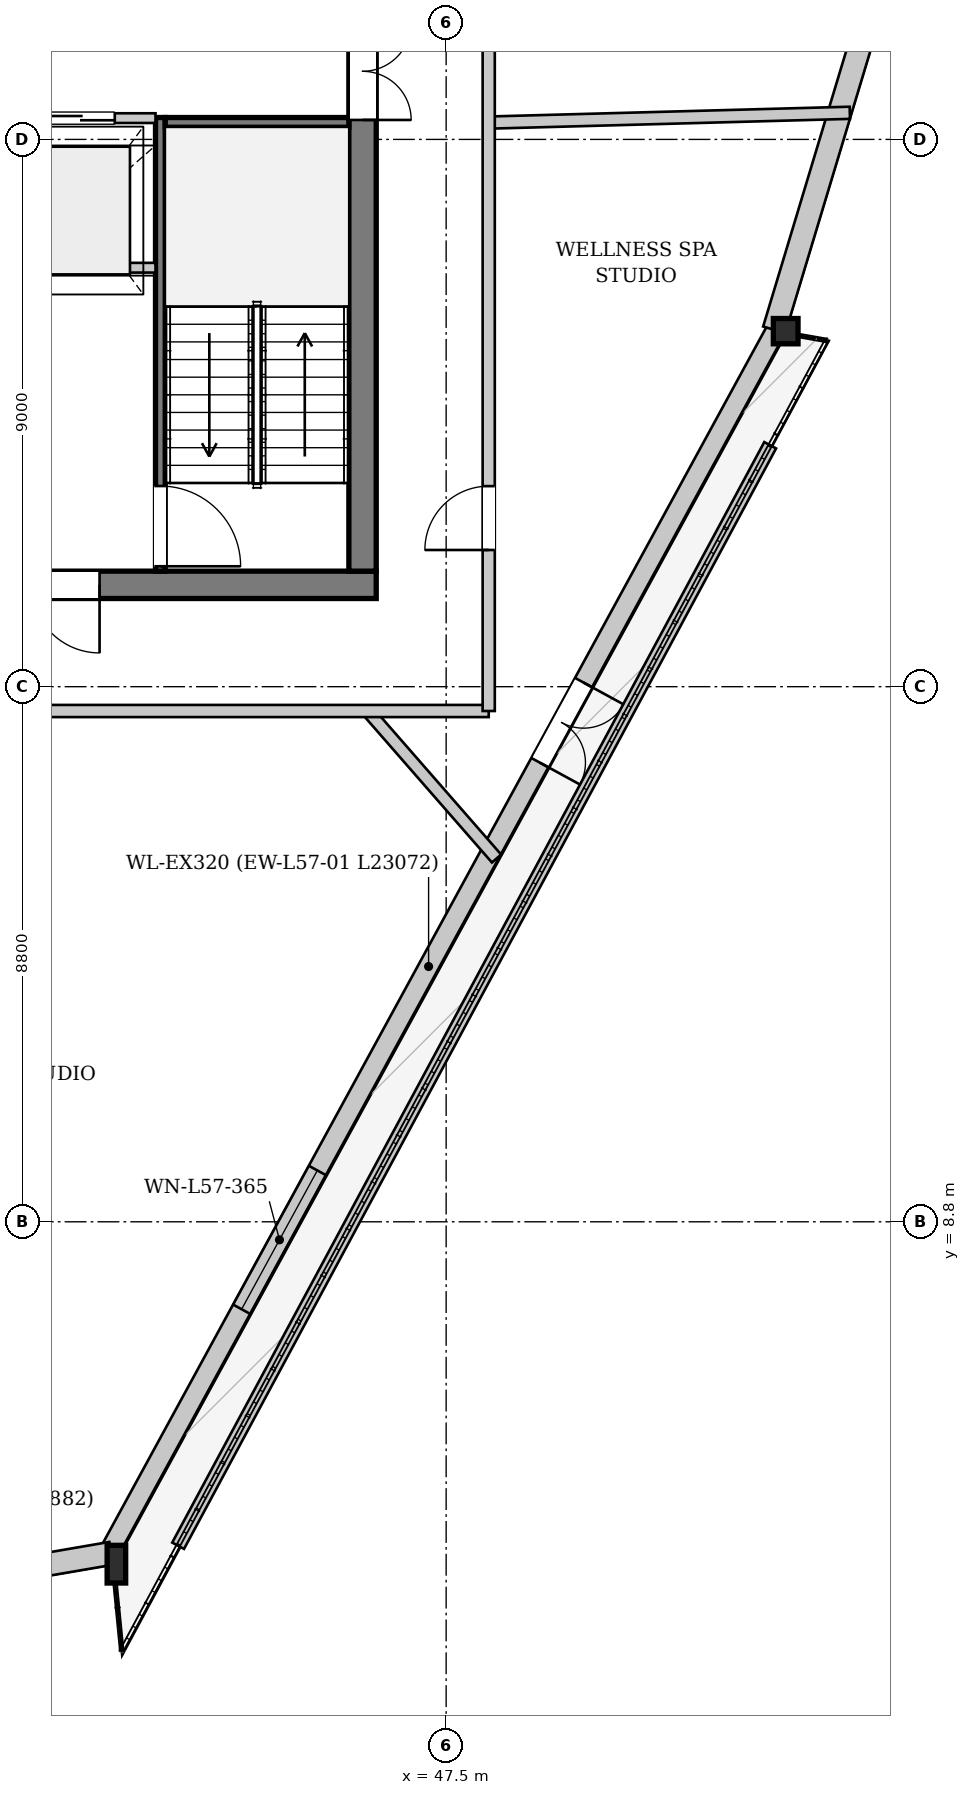
"""IFC4 building model, lengths in metres.
Left out: names, types, materials, properties, quantities, classifications, styles, units other than length and angle.
Written with IfcOpenShell. Run it as: python <this file> out.ifc"""

import sys

from ifc_helpers import new_model, si_unit, direction, frame, frame_2d, origin, origin_2d, place, context, subcontext, project, spatial, rectangle, i_section, extrude, source, transform, mapped, element, fill, save


model = new_model("IFC4")
c1 = context("Model", 3, precision=1e-05, world=origin(), true_north=direction((0.0, 1.0)))
c2 = subcontext(c1, "Body", "Model", "MODEL_VIEW")
j1 = project(units=[si_unit("LENGTHUNIT", "METRE"), si_unit("PLANEANGLEUNIT", "RADIAN")], contexts=[c1])
p1 = place(None, origin())
s1 = spatial("IfcSite", under=j1, at=p1, CompositionType="ELEMENT")
p2 = place(p1, origin())
s2 = spatial("IfcBuilding", under=s1, at=p2, CompositionType="ELEMENT")
p3 = place(p2, frame((0.0, 0.0, 216.7)))
s3 = spatial("IfcBuildingStorey", under=s2, at=p3, CompositionType="ELEMENT", Elevation=216.7)
m1 = source(origin(), c2, "Body", "SweptSolid", [
    extrude(i_section(OverallWidth=0.305, OverallDepth=0.62, WebThickness=0.021, FlangeThickness=0.04, at=origin_2d()), origin(), (0.0, 0.0, 1.0), 3.387),
])
p4 = place(p3, frame((42.026, 3.161, 0.0), z_axis=(0.030205770374, 0.005262580519, 0.99952984782), x_axis=(-0.17163884395, 0.985159939932, 0.0)))
e1 = element("IfcColumn", 1, at=p4, inside=s3, PredefinedType="COLUMN", context=c2, shape_type="MappedRepresentation", body=[
    mapped(m1, transform((0.0, 0.0, 0.0), x_axis=(1.0, 0.0, 0.0), y_axis=(0.0, 1.0, 0.0), z_axis=(0.0, 0.0, 1.0), scale=1.0)),
])
m2 = source(origin(), c2, "Body", "SweptSolid", [
    extrude(i_section(OverallWidth=0.406, OverallDepth=0.416, WebThickness=0.027, FlangeThickness=0.042, at=origin_2d()), origin(), (0.0, 0.0, 1.0), 3.386),
])
p5 = place(p3, frame((53.077, 23.414, 0.0), z_axis=(0.004038154122, 0.019397561765, 0.999803694687), x_axis=(-0.979010687194, 0.203808916293, 0.0)))
e2 = element("IfcColumn", 2, at=p5, inside=s3, PredefinedType="COLUMN", context=c2, shape_type="MappedRepresentation", body=[
    mapped(m2, transform((0.0, 0.0, 0.0), x_axis=(1.0, 0.0, 0.0), y_axis=(0.0, 1.0, 0.0), z_axis=(0.0, 0.0, 1.0), scale=1.0)),
])
p6 = place(p3, frame((52.937, 23.49, 0.0), z_axis=(0.0, 0.0, 1.0), x_axis=(-0.479001143565, -0.877814276748, 0.0)))
e3 = element("IfcWall", 3, at=p6, inside=s3, PredefinedType="SOLIDWALL", context=c2, shape_type="SweptSolid", body=[
    extrude(rectangle(XDim=23.072, YDim=0.32, at=frame_2d((11.536, 0.0))), origin(), (0.0, 0.0, 1.0), 2.822),
])
p7 = place(p6, frame((6.633, 0.0, 0.0)))
e4 = element("IfcOpeningElement", 4, at=p7, cuts=e3, PredefinedType="OPENING", context=c2, shape_type="SweptSolid", body=[
    extrude(rectangle(XDim=1.5, YDim=2.3, at=frame_2d((0.75, 1.15))), frame((0.0, 0.17, 0.0), z_axis=(0.0, -1.0, 0.0), x_axis=(1.0, 0.0, 0.0)), (0.0, 0.0, 1.0), 0.34),
])
p8 = place(p6, frame((15.773, 0.0, 0.352)))
e5 = element("IfcOpeningElement", 5, at=p8, cuts=e3, PredefinedType="OPENING", context=c2, shape_type="SweptSolid", body=[
    extrude(rectangle(XDim=2.6, YDim=2.35, at=frame_2d((1.3, 1.175))), frame((0.0, 0.17, 0.0), z_axis=(0.0, -1.0, 0.0), x_axis=(1.0, 0.0, 0.0)), (0.0, 0.0, 1.0), 0.34),
])
p9 = place(p3, frame((41.993, 3.348, 0.0), z_axis=(0.0, 0.0, 1.0), x_axis=(-0.985564143449, -0.169302448737, 0.0)))
e6 = element("IfcWall", 6, at=p9, inside=s3, PredefinedType="SOLIDWALL", context=c2, shape_type="SweptSolid", body=[
    extrude(rectangle(XDim=3.882, YDim=0.38, at=frame_2d((1.941, 0.0))), origin(), (0.0, 0.0, 1.0), 2.822),
])
p10 = place(p3, frame((59.556, 45.558, 0.0), z_axis=(0.0, 0.0, 1.0), x_axis=(-0.288699918193, -0.95741963487, 0.0)))
e7 = element("IfcWall", 7, at=p10, inside=s3, PredefinedType="SOLIDWALL", context=c2, shape_type="SweptSolid", body=[
    extrude(rectangle(XDim=23.072, YDim=0.38, at=frame_2d((11.536, 0.0))), origin(), (0.0, 0.0, 1.0), 2.822),
])
p11 = place(p10, frame((5.36, 0.0, 0.452)))
e8 = element("IfcOpeningElement", 8, at=p11, cuts=e7, PredefinedType="OPENING", context=c2, shape_type="SweptSolid", body=[
    extrude(rectangle(XDim=2.2, YDim=2.25, at=frame_2d((1.1, 1.125))), frame((0.0, 0.2, 0.0), z_axis=(0.0, -1.0, 0.0), x_axis=(1.0, 0.0, 0.0)), (0.0, 0.0, 1.0), 0.4),
])
p12 = place(p10, frame((15.512, 0.0, 0.452)))
e9 = element("IfcOpeningElement", 9, at=p12, cuts=e7, PredefinedType="OPENING", context=c2, shape_type="SweptSolid", body=[
    extrude(rectangle(XDim=2.2, YDim=2.25, at=frame_2d((1.1, 1.125))), frame((0.0, 0.2, 0.0), z_axis=(0.0, -1.0, 0.0), x_axis=(1.0, 0.0, 0.0)), (0.0, 0.0, 1.0), 0.4),
])
p13 = place(p3, frame((43.092, 3.473, 0.0), z_axis=(0.0, 0.0, 1.0), x_axis=(0.473808636285, 0.880627830688, 0.0)))
e10 = element("IfcWall", 10, at=p13, inside=s3, PredefinedType="PARAPET", context=c2, shape_type="SweptSolid", body=[
    extrude(rectangle(XDim=20.551, YDim=0.22, at=frame_2d((10.275, 0.0))), origin(), (0.0, 0.0, 1.0), 0.3),
])
p14 = place(p3, frame((46.35, 19.275, 0.0), z_axis=(0.0, 0.0, 1.0), x_axis=(-1.0, 0.0, 0.0)))
e11 = element("IfcWall", 11, at=p14, inside=s3, PredefinedType="SHEAR", context=c2, shape_type="SweptSolid", body=[
    extrude(rectangle(XDim=16.7, YDim=0.45, at=frame_2d((8.35, 0.0))), origin(), (0.0, 0.0, 1.0), 3.33),
])
p15 = place(p14, frame((4.55, 0.0, 0.0)))
e12 = element("IfcOpeningElement", 12, at=p15, cuts=e11, PredefinedType="OPENING", context=c2, shape_type="SweptSolid", body=[
    extrude(rectangle(XDim=1.12, YDim=2.25, at=frame_2d((0.56, 1.125))), frame((0.0, 0.235, 0.0), z_axis=(0.0, -1.0, 0.0), x_axis=(1.0, 0.0, 0.0)), (0.0, 0.0, 1.0), 0.47),
])
p16 = place(p14, frame((11.05, 0.0, 0.0)))
e13 = element("IfcOpeningElement", 13, at=p16, cuts=e11, PredefinedType="OPENING", context=c2, shape_type="SweptSolid", body=[
    extrude(rectangle(XDim=1.12, YDim=2.25, at=frame_2d((0.56, 1.125))), frame((0.0, 0.235, 0.0), z_axis=(0.0, -1.0, 0.0), x_axis=(1.0, 0.0, 0.0)), (0.0, 0.0, 1.0), 0.47),
])
p17 = place(p3, frame((46.125, 33.7, 0.0), z_axis=(0.0, 0.0, 1.0), x_axis=(0.0, -1.0, 0.0)))
e14 = element("IfcWall", 14, at=p17, inside=s3, PredefinedType="SHEAR", context=c2, shape_type="SweptSolid", body=[
    extrude(rectangle(XDim=14.2, YDim=0.45, at=frame_2d((7.1, 0.0))), origin(), (0.0, 0.0, 1.0), 3.33),
])
p18 = place(p17, frame((5.18, 0.0, 0.0)))
e15 = element("IfcOpeningElement", 15, at=p18, cuts=e14, PredefinedType="OPENING", context=c2, shape_type="SweptSolid", body=[
    extrude(rectangle(XDim=1.6, YDim=2.2, at=frame_2d((0.8, 1.1))), frame((0.0, 0.235, 0.0), z_axis=(0.0, -1.0, 0.0), x_axis=(1.0, 0.0, 0.0)), (0.0, 0.0, 1.0), 0.47),
])
p19 = place(p17, frame((2.05, 0.0, 0.0)))
e16 = element("IfcOpeningElement", 16, at=p19, cuts=e14, PredefinedType="OPENING", context=c2, shape_type="SweptSolid", body=[
    extrude(rectangle(XDim=0.95, YDim=2.1, at=frame_2d((0.475, 1.05))), frame((0.0, 0.235, 0.0), z_axis=(0.0, -1.0, 0.0), x_axis=(1.0, 0.0, 0.0)), (0.0, 0.0, 1.0), 0.47),
])
p20 = place(p3, frame((42.8, 26.96, 0.0), z_axis=(0.0, 0.0, 1.0), x_axis=(0.0, -1.0, 0.0)))
e17 = element("IfcWall", 17, at=p20, inside=s3, PredefinedType="PARTITIONING", context=c2, shape_type="SweptSolid", body=[
    extrude(rectangle(XDim=7.46, YDim=0.16, at=frame_2d((3.73, 0.0))), origin(), (0.0, 0.0, 1.0), 3.33),
])
p21 = place(p20, frame((6.06, 0.0, 0.0)))
e18 = element("IfcOpeningElement", 18, at=p21, cuts=e17, PredefinedType="OPENING", context=c2, shape_type="SweptSolid", body=[
    extrude(rectangle(XDim=1.32, YDim=2.2, at=frame_2d((0.66, 1.1))), frame((0.0, 0.09, 0.0), z_axis=(0.0, -1.0, 0.0), x_axis=(1.0, 0.0, 0.0)), (0.0, 0.0, 1.0), 0.18),
])
p22 = place(p3, frame((42.88, 26.88, 0.0), z_axis=(0.0, 0.0, 1.0), x_axis=(1.0, 0.0, 0.0)))
e19 = element("IfcWall", 19, at=p22, inside=s3, PredefinedType="PARTITIONING", context=c2, shape_type="SweptSolid", body=[
    extrude(rectangle(XDim=3.02, YDim=0.16, at=frame_2d((1.51, 0.0))), origin(), (0.0, 0.0, 1.0), 3.33),
])
p23 = place(p3, frame((33.28, 24.49, 0.0), z_axis=(0.0, 0.0, 1.0), x_axis=(1.0, 0.0, 0.0)))
e20 = element("IfcWall", 20, at=p23, inside=s3, PredefinedType="PARTITIONING", context=c2, shape_type="SweptSolid", body=[
    extrude(rectangle(XDim=9.44, YDim=0.16, at=frame_2d((4.72, 0.0))), origin(), (0.0, 0.0, 1.0), 3.33),
])
p24 = place(p3, frame((33.28, 26.95, 0.0), z_axis=(0.0, 0.0, 1.0), x_axis=(1.0, 0.0, 0.0)))
e21 = element("IfcWall", 21, at=p24, inside=s3, PredefinedType="PARTITIONING", context=c2, shape_type="SweptSolid", body=[
    extrude(rectangle(XDim=9.44, YDim=0.16, at=frame_2d((4.72, 0.0))), origin(), (0.0, 0.0, 1.0), 3.33),
])
p25 = place(p24, frame((1.2, 0.0, 0.0)))
e22 = element("IfcOpeningElement", 22, at=p25, cuts=e21, PredefinedType="OPENING", context=c2, shape_type="SweptSolid", body=[
    extrude(rectangle(XDim=0.95, YDim=2.1, at=frame_2d((0.475, 1.05))), frame((0.0, 0.09, 0.0), z_axis=(0.0, -1.0, 0.0), x_axis=(1.0, 0.0, 0.0)), (0.0, 0.0, 1.0), 0.18),
])
p26 = place(p24, frame((4.65, 0.0, 0.0)))
e23 = element("IfcOpeningElement", 23, at=p26, cuts=e21, PredefinedType="OPENING", context=c2, shape_type="SweptSolid", body=[
    extrude(rectangle(XDim=0.95, YDim=2.1, at=frame_2d((0.475, 1.05))), frame((0.0, 0.09, 0.0), z_axis=(0.0, -1.0, 0.0), x_axis=(1.0, 0.0, 0.0)), (0.0, 0.0, 1.0), 0.18),
])
p27 = place(p24, frame((7.67, 0.0, 0.0)))
e24 = element("IfcOpeningElement", 24, at=p27, cuts=e21, PredefinedType="OPENING", context=c2, shape_type="SweptSolid", body=[
    extrude(rectangle(XDim=1.1, YDim=2.2, at=frame_2d((0.55, 1.1))), frame((0.0, 0.09, 0.0), z_axis=(0.0, -1.0, 0.0), x_axis=(1.0, 0.0, 0.0)), (0.0, 0.0, 1.0), 0.18),
])
p28 = place(p3, frame((46.21, 17.2, 0.0), z_axis=(0.0, 0.0, 1.0), x_axis=(0.657822855657, -0.753172683105, 0.0)))
e25 = element("IfcWall", 25, at=p28, inside=s3, PredefinedType="PARTITIONING", context=c2, shape_type="SweptSolid", body=[
    extrude(rectangle(XDim=3.221, YDim=0.2, at=frame_2d((1.611, 0.0))), origin(), (0.0, 0.0, 1.0), 3.33),
])
p29 = place(p3, frame((48.2, 26.877, 0.0), z_axis=(0.0, 0.0, 1.0), x_axis=(0.999633258154, 0.027080420831, 0.0)))
e26 = element("IfcWall", 26, at=p29, inside=s3, PredefinedType="PARTITIONING", context=c2, shape_type="SweptSolid", body=[
    extrude(rectangle(XDim=5.941, YDim=0.2, at=frame_2d((2.971, 0.0))), origin(), (0.0, 0.0, 1.0), 3.33),
])
p30 = place(p3, frame((27.8, 17.2, 0.0), z_axis=(0.0, 0.0, 1.0), x_axis=(1.0, 0.0, 0.0)))
e27 = element("IfcWall", 27, at=p30, inside=s3, PredefinedType="PARTITIONING", context=c2, shape_type="SweptSolid", body=[
    extrude(rectangle(XDim=20.4, YDim=0.2, at=frame_2d((10.2, 0.0))), origin(), (0.0, 0.0, 1.0), 3.33),
])
p31 = place(p30, frame((1.22, 0.0, 0.0)))
e28 = element("IfcOpeningElement", 28, at=p31, cuts=e27, PredefinedType="OPENING", context=c2, shape_type="SweptSolid", body=[
    extrude(rectangle(XDim=1.05, YDim=2.2, at=frame_2d((0.525, 1.1))), frame((0.0, 0.11, 0.0), z_axis=(0.0, -1.0, 0.0), x_axis=(1.0, 0.0, 0.0)), (0.0, 0.0, 1.0), 0.22),
])
p32 = place(p30, frame((11.699, 0.0, 0.0)))
e29 = element("IfcOpeningElement", 29, at=p32, cuts=e27, PredefinedType="OPENING", context=c2, shape_type="SweptSolid", body=[
    extrude(rectangle(XDim=1.05, YDim=2.2, at=frame_2d((0.525, 1.1))), frame((0.0, 0.11, 0.0), z_axis=(0.0, -1.0, 0.0), x_axis=(1.0, 0.0, 0.0)), (0.0, 0.0, 1.0), 0.22),
])
p33 = place(p3, frame((48.2, 17.2, 0.0), z_axis=(0.0, 0.0, 1.0), x_axis=(0.0, 1.0, 0.0)))
e30 = element("IfcWall", 30, at=p33, inside=s3, PredefinedType="PARTITIONING", context=c2, shape_type="SweptSolid", body=[
    extrude(rectangle(XDim=18.8, YDim=0.2, at=frame_2d((9.4, 0.0))), origin(), (0.0, 0.0, 1.0), 3.33),
])
p34 = place(p33, frame((2.648, 0.0, 0.0)))
e31 = element("IfcOpeningElement", 31, at=p34, cuts=e30, PredefinedType="OPENING", context=c2, shape_type="SweptSolid", body=[
    extrude(rectangle(XDim=1.05, YDim=2.2, at=frame_2d((0.525, 1.1))), frame((0.0, 0.11, 0.0), z_axis=(0.0, -1.0, 0.0), x_axis=(1.0, 0.0, 0.0)), (0.0, 0.0, 1.0), 0.22),
])
m3 = source(origin(), c2, "Body", "SweptSolid", [
    extrude(rectangle(XDim=1.5, YDim=2.3, at=frame_2d((0.75, 1.15))), frame((0.0, 0.025, 0.0), z_axis=(0.0, -1.0, 0.0), x_axis=(1.0, 0.0, 0.0)), (0.0, 0.0, 1.0), 0.05),
])
p35 = place(p7, origin())
e32 = element("IfcDoor", 32, at=p35, inside=s3, OperationType="DOUBLE_DOOR_SINGLE_SWING", PredefinedType="DOOR", context=c2, shape_type="MappedRepresentation", body=[
    mapped(m3, transform((0.0, 0.0, 0.0), x_axis=(1.0, 0.0, 0.0), y_axis=(0.0, 1.0, 0.0), z_axis=(0.0, 0.0, 1.0), scale=1.0)),
])
fill(e4, e32)
m4 = source(origin(), c2, "Body", "SweptSolid", [
    extrude(rectangle(XDim=2.6, YDim=2.35, at=frame_2d((1.3, 1.175))), frame((0.0, 0.03, 0.0), z_axis=(0.0, -1.0, 0.0), x_axis=(1.0, 0.0, 0.0)), (0.0, 0.0, 1.0), 0.06),
])
p36 = place(p8, origin())
e33 = element("IfcWindow", 33, at=p36, inside=s3, PartitioningType="SINGLE_PANEL", PredefinedType="WINDOW", context=c2, shape_type="MappedRepresentation", body=[
    mapped(m4, transform((0.0, 0.0, 0.0), x_axis=(1.0, 0.0, 0.0), y_axis=(0.0, 1.0, 0.0), z_axis=(0.0, 0.0, 1.0), scale=1.0)),
])
fill(e5, e33)
m5 = source(origin(), c2, "Body", "SweptSolid", [
    extrude(rectangle(XDim=1.12, YDim=2.25, at=frame_2d((0.56, 1.125))), frame((0.0, 0.025, 0.0), z_axis=(0.0, -1.0, 0.0), x_axis=(1.0, 0.0, 0.0)), (0.0, 0.0, 1.0), 0.05),
])
p37 = place(p15, origin())
e34 = element("IfcDoor", 34, at=p37, inside=s3, OperationType="SINGLE_SWING_LEFT", PredefinedType="DOOR", context=c2, shape_type="MappedRepresentation", body=[
    mapped(m5, transform((0.0, 0.0, 0.0), x_axis=(1.0, 0.0, 0.0), y_axis=(0.0, 1.0, 0.0), z_axis=(0.0, 0.0, 1.0), scale=1.0)),
])
fill(e12, e34)
m6 = source(origin(), c2, "Body", "SweptSolid", [
    extrude(rectangle(XDim=1.6, YDim=2.2, at=frame_2d((0.8, 1.1))), frame((0.0, 0.025, 0.0), z_axis=(0.0, -1.0, 0.0), x_axis=(1.0, 0.0, 0.0)), (0.0, 0.0, 1.0), 0.05),
])
p38 = place(p18, origin())
e35 = element("IfcDoor", 35, at=p38, inside=s3, OperationType="DOUBLE_DOOR_SINGLE_SWING", PredefinedType="DOOR", context=c2, shape_type="MappedRepresentation", body=[
    mapped(m6, transform((0.0, 0.0, 0.0), x_axis=(1.0, 0.0, 0.0), y_axis=(0.0, 1.0, 0.0), z_axis=(0.0, 0.0, 1.0), scale=1.0)),
])
fill(e15, e35)
m7 = source(origin(), c2, "Body", "SweptSolid", [
    extrude(rectangle(XDim=1.32, YDim=2.2, at=frame_2d((0.66, 1.1))), frame((0.0, 0.025, 0.0), z_axis=(0.0, -1.0, 0.0), x_axis=(1.0, 0.0, 0.0)), (0.0, 0.0, 1.0), 0.05),
])
p39 = place(p21, origin())
e36 = element("IfcDoor", 36, at=p39, inside=s3, OperationType="SINGLE_SWING_RIGHT", PredefinedType="DOOR", context=c2, shape_type="MappedRepresentation", body=[
    mapped(m7, transform((0.0, 0.0, 0.0), x_axis=(1.0, 0.0, 0.0), y_axis=(0.0, 1.0, 0.0), z_axis=(0.0, 0.0, 1.0), scale=1.0)),
])
fill(e18, e36)
m8 = source(origin(), c2, "Body", "SweptSolid", [
    extrude(rectangle(XDim=1.1, YDim=2.2, at=frame_2d((0.55, 1.1))), frame((0.0, 0.025, 0.0), z_axis=(0.0, -1.0, 0.0), x_axis=(1.0, 0.0, 0.0)), (0.0, 0.0, 1.0), 0.05),
])
p40 = place(p27, origin())
e37 = element("IfcDoor", 37, at=p40, inside=s3, OperationType="DOUBLE_DOOR_SLIDING", PredefinedType="DOOR", context=c2, shape_type="MappedRepresentation", body=[
    mapped(m8, transform((0.0, 0.0, 0.0), x_axis=(1.0, 0.0, 0.0), y_axis=(0.0, 1.0, 0.0), z_axis=(0.0, 0.0, 1.0), scale=1.0)),
])
fill(e24, e37)
m9 = source(origin(), c2, "Body", "SweptSolid", [
    extrude(rectangle(XDim=1.05, YDim=2.2, at=frame_2d((0.525, 1.1))), frame((0.0, 0.025, 0.0), z_axis=(0.0, -1.0, 0.0), x_axis=(1.0, 0.0, 0.0)), (0.0, 0.0, 1.0), 0.05),
])
p41 = place(p34, origin())
e38 = element("IfcDoor", 38, at=p41, inside=s3, OperationType="SINGLE_SWING_LEFT", PredefinedType="DOOR", context=c2, shape_type="MappedRepresentation", body=[
    mapped(m9, transform((0.0, 0.0, 0.0), x_axis=(1.0, 0.0, 0.0), y_axis=(0.0, 1.0, 0.0), z_axis=(0.0, 0.0, 1.0), scale=1.0)),
])
fill(e31, e38)
save(model, sys.argv[1])
